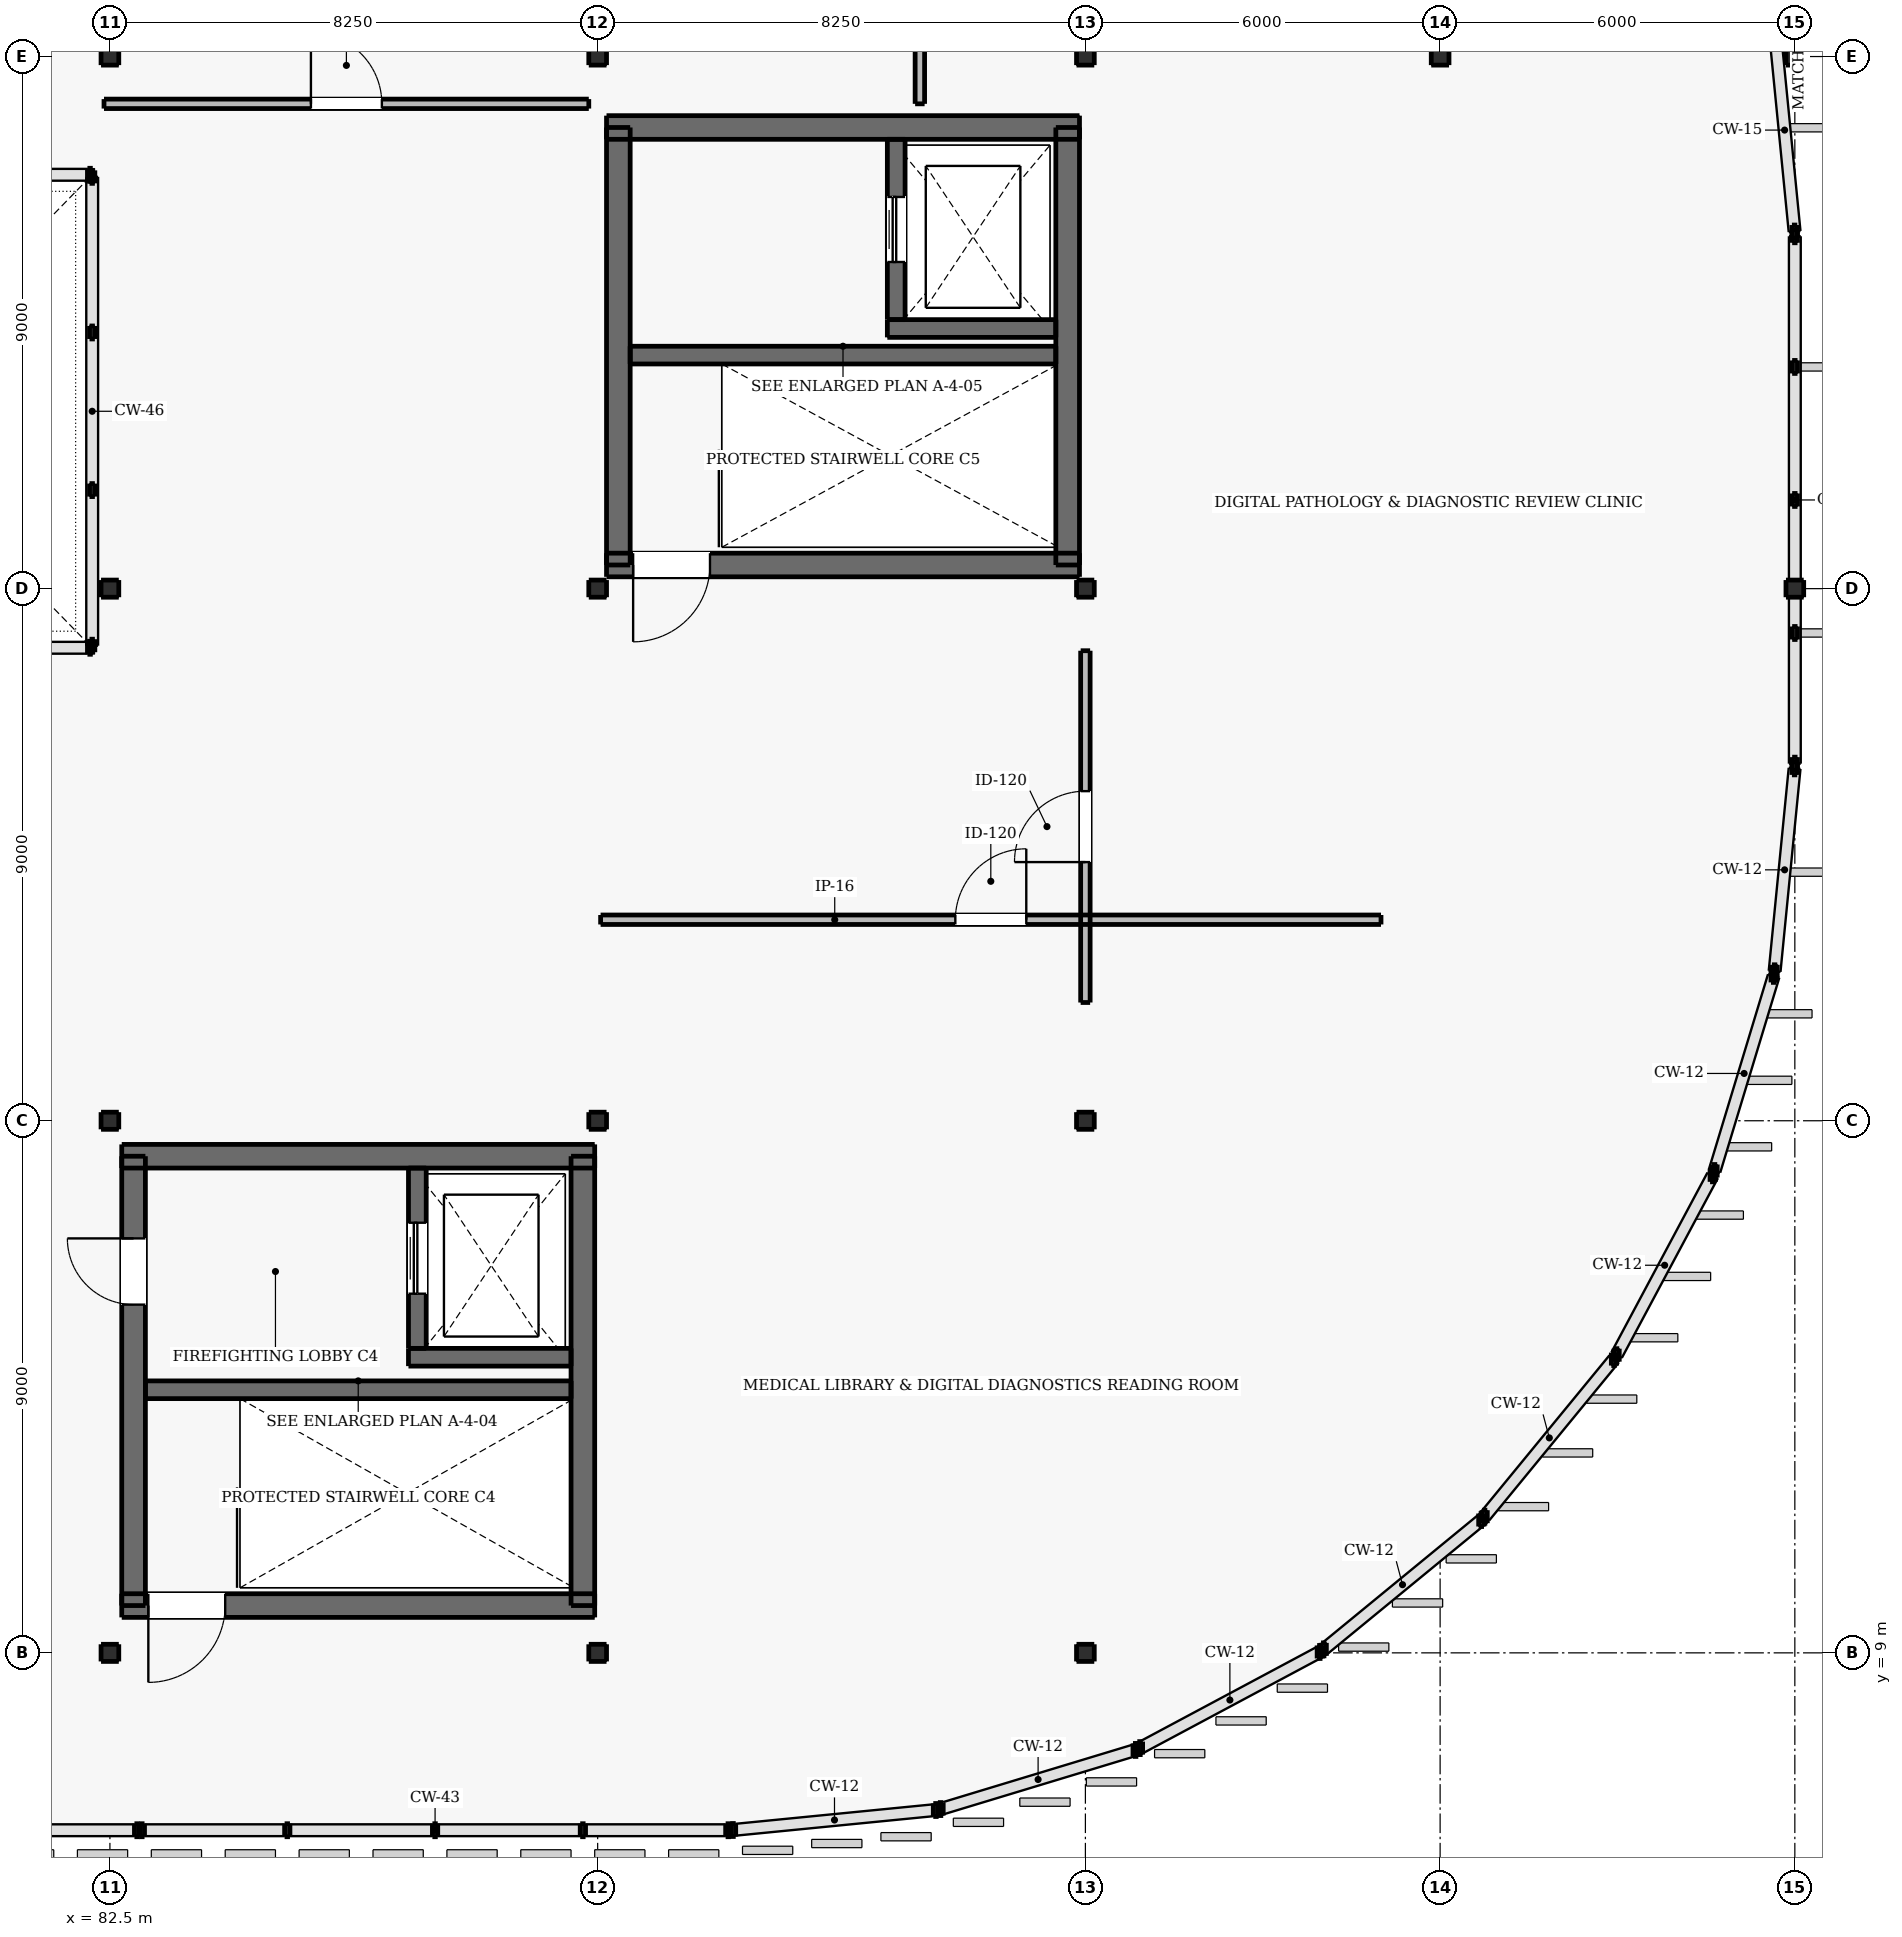
"""IFC4 building model, lengths in metres.
Left out: names, types, materials, properties, quantities, classifications, styles, units other than length and angle.
Written with IfcOpenShell. Run it as: python <this file> out.ifc"""

import sys

from ifc_helpers import new_model, si_unit, direction, frame, frame_2d, origin, origin_2d, place, context, subcontext, project, spatial, rectangle, i_section, extrude, element, fill, save


model = new_model("IFC4")
c1 = context("Model", 3, precision=1e-05, world=origin(), true_north=direction((0.0, 1.0)))
c2 = subcontext(c1, "Body", "Model", "MODEL_VIEW")
j1 = project(units=[si_unit("LENGTHUNIT", "METRE"), si_unit("PLANEANGLEUNIT", "RADIAN")], contexts=[c1])
p1 = place(None, origin())
s1 = spatial("IfcSite", under=j1, at=p1, CompositionType="ELEMENT")
p2 = place(p1, origin())
s2 = spatial("IfcBuilding", under=s1, at=p2, CompositionType="ELEMENT")
p3 = place(p2, frame((0.0, 0.0, 26.4)))
s3 = spatial("IfcBuildingStorey", under=s2, at=p3, CompositionType="ELEMENT", Elevation=26.4)
for number, where, z_axis, x_axis in (
    (1, (82.5, 9.0, 0.0), (0.0, 0.0, 1.0), (1.0, 0.0, 0.0)),
    (2, (82.5, 18.0, 0.0), (0.0, 0.0, 1.0), (1.0, 0.0, 0.0)),
    (3, (82.5, 27.0, 0.0), (0.0, 0.0, 1.0), (1.0, 0.0, 0.0)),
    (4, (82.5, 36.0, 0.0), (0.0, 0.0, 1.0), (1.0, 0.0, 0.0)),
    (5, (90.75, 9.0, 0.0), (0.0, 0.0, 1.0), (1.0, 0.0, 0.0)),
    (6, (90.75, 18.0, 0.0), (0.0, 0.0, 1.0), (1.0, 0.0, 0.0)),
    (7, (90.75, 27.0, 0.0), (0.0, 0.0, 1.0), (1.0, 0.0, 0.0)),
    (8, (90.75, 36.0, 0.0), (0.0, 0.0, 1.0), (1.0, 0.0, 0.0)),
    (9, (99.0, 9.0, 0.0), (0.0, 0.0, 1.0), (1.0, 0.0, 0.0)),
    (10, (99.0, 18.0, 0.0), (0.0, 0.0, 1.0), (1.0, 0.0, 0.0)),
    (11, (99.0, 27.0, 0.0), (0.0, 0.0, 1.0), (1.0, 0.0, 0.0)),
    (12, (99.0, 36.0, 0.0), (0.0, 0.0, 1.0), (1.0, 0.0, 0.0)),
    (13, (105.0, 36.0, 0.0), (0.0, 0.0, 1.0), (1.0, 0.0, 0.0)),
    (14, (111.0, 27.0, 0.0), (0.0, 0.0, 1.0), (1.0, 0.0, 0.0)),
    (15, (111.0, 36.0, 0.0), (0.0, 0.0, 1.0), (1.0, 0.0, 0.0)),
):
    element("IfcColumn", number, at=place(p3, frame(where, z_axis=z_axis, x_axis=x_axis)), inside=s3, PredefinedType="COLUMN", context=c2, shape_type="SweptSolid", body=[
        extrude(i_section(OverallWidth=0.3, OverallDepth=0.29, WebThickness=0.009, FlangeThickness=0.014, FilletRadius=0.027, at=origin_2d()), origin(), (0.0, 0.0, 1.0), 4.2),
    ])
p4 = place(p3, frame((82.7, 9.8, 0.0), z_axis=(0.0, 0.0, 1.0), x_axis=(1.0, 0.0, 0.0)))
e16 = element("IfcWall", 16, at=p4, inside=s3, PredefinedType="SHEAR", context=c2, shape_type="SweptSolid", body=[
    extrude(rectangle(XDim=8.0, YDim=0.4, at=frame_2d((4.0, 0.0))), origin(), (0.0, 0.0, 1.0), 4.2),
])
p5 = place(p4, frame((0.45, 0.0, 0.0)))
e17 = element("IfcOpeningElement", 17, at=p5, cuts=e16, PredefinedType="OPENING", context=c2, shape_type="SweptSolid", body=[
    extrude(rectangle(XDim=1.3, YDim=2.15, at=frame_2d((0.65, 1.075))), frame((0.0, 0.21, 0.0), z_axis=(0.0, -1.0, 0.0), x_axis=(1.0, 0.0, 0.0)), (0.0, 0.0, 1.0), 0.42),
])
p6 = place(p3, frame((82.7, 17.4, 0.0), z_axis=(0.0, 0.0, 1.0), x_axis=(1.0, 0.0, 0.0)))
e18 = element("IfcWall", 18, at=p6, inside=s3, PredefinedType="SHEAR", context=c2, shape_type="SweptSolid", body=[
    extrude(rectangle(XDim=8.0, YDim=0.4, at=frame_2d((4.0, 0.0))), origin(), (0.0, 0.0, 1.0), 4.2),
])
p7 = place(p3, frame((82.9, 9.8, 0.0), z_axis=(0.0, 0.0, 1.0), x_axis=(0.0, 1.0, 0.0)))
e19 = element("IfcWall", 19, at=p7, inside=s3, PredefinedType="SHEAR", context=c2, shape_type="SweptSolid", body=[
    extrude(rectangle(XDim=7.6, YDim=0.4, at=frame_2d((3.8, 0.0))), origin(), (0.0, 0.0, 1.0), 4.2),
])
p8 = place(p7, frame((5.09, 0.0, 0.0)))
e20 = element("IfcOpeningElement", 20, at=p8, cuts=e19, PredefinedType="OPENING", context=c2, shape_type="SweptSolid", body=[
    extrude(rectangle(XDim=1.12, YDim=2.15, at=frame_2d((0.56, 1.075))), frame((0.0, 0.21, 0.0), z_axis=(0.0, -1.0, 0.0), x_axis=(1.0, 0.0, 0.0)), (0.0, 0.0, 1.0), 0.42),
])
p9 = place(p3, frame((90.5, 9.8, 0.0), z_axis=(0.0, 0.0, 1.0), x_axis=(0.0, 1.0, 0.0)))
e21 = element("IfcWall", 21, at=p9, inside=s3, PredefinedType="SHEAR", context=c2, shape_type="SweptSolid", body=[
    extrude(rectangle(XDim=7.6, YDim=0.4, at=frame_2d((3.8, 0.0))), origin(), (0.0, 0.0, 1.0), 4.2),
])
p10 = place(p3, frame((83.1, 13.45, 0.0), z_axis=(0.0, 0.0, 1.0), x_axis=(1.0, 0.0, 0.0)))
e22 = element("IfcWall", 22, at=p10, inside=s3, PredefinedType="SHEAR", context=c2, shape_type="SweptSolid", body=[
    extrude(rectangle(XDim=7.2, YDim=0.3, at=frame_2d((3.6, 0.0))), origin(), (0.0, 0.0, 1.0), 4.2),
])
p11 = place(p3, frame((87.55, 14.0, 0.0), z_axis=(0.0, 0.0, 1.0), x_axis=(1.0, 0.0, 0.0)))
e23 = element("IfcWall", 23, at=p11, inside=s3, PredefinedType="SHEAR", context=c2, shape_type="SweptSolid", body=[
    extrude(rectangle(XDim=2.75, YDim=0.3, at=frame_2d((1.375, 0.0))), origin(), (0.0, 0.0, 1.0), 4.2),
])
p12 = place(p3, frame((87.7, 14.15, 0.0), z_axis=(0.0, 0.0, 1.0), x_axis=(0.0, 1.0, 0.0)))
e24 = element("IfcWall", 24, at=p12, inside=s3, PredefinedType="SHEAR", context=c2, shape_type="SweptSolid", body=[
    extrude(rectangle(XDim=3.05, YDim=0.3, at=frame_2d((1.525, 0.0))), origin(), (0.0, 0.0, 1.0), 4.2),
])
p13 = place(p12, frame((0.925, 0.0, 0.0)))
e25 = element("IfcOpeningElement", 25, at=p13, cuts=e24, PredefinedType="OPENING", context=c2, shape_type="SweptSolid", body=[
    extrude(rectangle(XDim=1.2, YDim=2.15, at=frame_2d((0.6, 1.075))), frame((0.0, 0.16, 0.0), z_axis=(0.0, -1.0, 0.0), x_axis=(1.0, 0.0, 0.0)), (0.0, 0.0, 1.0), 0.32),
])
p14 = place(p3, frame((90.9, 27.4, 0.0), z_axis=(0.0, 0.0, 1.0), x_axis=(1.0, 0.0, 0.0)))
e26 = element("IfcWall", 26, at=p14, inside=s3, PredefinedType="SHEAR", context=c2, shape_type="SweptSolid", body=[
    extrude(rectangle(XDim=8.0, YDim=0.4, at=frame_2d((4.0, 0.0))), origin(), (0.0, 0.0, 1.0), 4.2),
])
p15 = place(p14, frame((0.45, 0.0, 0.0)))
e27 = element("IfcOpeningElement", 27, at=p15, cuts=e26, PredefinedType="OPENING", context=c2, shape_type="SweptSolid", body=[
    extrude(rectangle(XDim=1.3, YDim=2.15, at=frame_2d((0.65, 1.075))), frame((0.0, 0.21, 0.0), z_axis=(0.0, -1.0, 0.0), x_axis=(1.0, 0.0, 0.0)), (0.0, 0.0, 1.0), 0.42),
])
p16 = place(p3, frame((90.9, 34.8, 0.0), z_axis=(0.0, 0.0, 1.0), x_axis=(1.0, 0.0, 0.0)))
e28 = element("IfcWall", 28, at=p16, inside=s3, PredefinedType="SHEAR", context=c2, shape_type="SweptSolid", body=[
    extrude(rectangle(XDim=8.0, YDim=0.4, at=frame_2d((4.0, 0.0))), origin(), (0.0, 0.0, 1.0), 4.2),
])
for number, where, z_axis, x_axis in (
    (29, (91.1, 27.4, 0.0), (0.0, 0.0, 1.0), (0.0, 1.0, 0.0)),
    (30, (98.7, 27.4, 0.0), (0.0, 0.0, 1.0), (0.0, 1.0, 0.0)),
):
    element("IfcWall", number, at=place(p3, frame(where, z_axis=z_axis, x_axis=x_axis)), inside=s3, PredefinedType="SHEAR", context=c2, shape_type="SweptSolid", body=[
        extrude(rectangle(XDim=7.4, YDim=0.4, at=frame_2d((3.7, 0.0))), origin(), (0.0, 0.0, 1.0), 4.2),
    ])
p17 = place(p3, frame((91.3, 30.95, 0.0), z_axis=(0.0, 0.0, 1.0), x_axis=(1.0, 0.0, 0.0)))
e31 = element("IfcWall", 31, at=p17, inside=s3, PredefinedType="SHEAR", context=c2, shape_type="SweptSolid", body=[
    extrude(rectangle(XDim=7.2, YDim=0.3, at=frame_2d((3.6, 0.0))), origin(), (0.0, 0.0, 1.0), 4.2),
])
p18 = place(p3, frame((95.65, 31.4, 0.0), z_axis=(0.0, 0.0, 1.0), x_axis=(1.0, 0.0, 0.0)))
e32 = element("IfcWall", 32, at=p18, inside=s3, PredefinedType="SHEAR", context=c2, shape_type="SweptSolid", body=[
    extrude(rectangle(XDim=2.85, YDim=0.3, at=frame_2d((1.425, 0.0))), origin(), (0.0, 0.0, 1.0), 4.2),
])
p19 = place(p3, frame((95.8, 31.55, 0.0), z_axis=(0.0, 0.0, 1.0), x_axis=(0.0, 1.0, 0.0)))
e33 = element("IfcWall", 33, at=p19, inside=s3, PredefinedType="SHEAR", context=c2, shape_type="SweptSolid", body=[
    extrude(rectangle(XDim=3.05, YDim=0.3, at=frame_2d((1.525, 0.0))), origin(), (0.0, 0.0, 1.0), 4.2),
])
p20 = place(p19, frame((0.975, 0.0, 0.0)))
e34 = element("IfcOpeningElement", 34, at=p20, cuts=e33, PredefinedType="OPENING", context=c2, shape_type="SweptSolid", body=[
    extrude(rectangle(XDim=1.1, YDim=2.15, at=frame_2d((0.55, 1.075))), frame((0.0, 0.16, 0.0), z_axis=(0.0, -1.0, 0.0), x_axis=(1.0, 0.0, 0.0)), (0.0, 0.0, 1.0), 0.32),
])
p21 = place(p3, frame((90.8, 21.4, 0.0), z_axis=(0.0, 0.0, 1.0), x_axis=(1.0, 0.0, 0.0)))
e35 = element("IfcWall", 35, at=p21, inside=s3, PredefinedType="PARTITIONING", context=c2, shape_type="SweptSolid", body=[
    extrude(rectangle(XDim=13.2, YDim=0.16, at=frame_2d((6.6, 0.0))), origin(), (0.0, 0.0, 1.0), 3.93),
])
p22 = place(p21, frame((6.0, 0.0, 0.0)))
e36 = element("IfcOpeningElement", 36, at=p22, cuts=e35, PredefinedType="OPENING", context=c2, shape_type="SweptSolid", body=[
    extrude(rectangle(XDim=1.2, YDim=2.2, at=frame_2d((0.6, 1.1))), frame((0.0, 0.09, 0.0), z_axis=(0.0, -1.0, 0.0), x_axis=(1.0, 0.0, 0.0)), (0.0, 0.0, 1.0), 0.18),
])
p23 = place(p3, frame((99.0, 20.0, 0.0), z_axis=(0.0, 0.0, 1.0), x_axis=(0.0, 1.0, 0.0)))
e37 = element("IfcWall", 37, at=p23, inside=s3, PredefinedType="PARTITIONING", context=c2, shape_type="SweptSolid", body=[
    extrude(rectangle(XDim=5.95, YDim=0.16, at=frame_2d((2.975, 0.0))), origin(), (0.0, 0.0, 1.0), 3.53),
])
p24 = place(p23, frame((2.375, 0.0, 0.0)))
e38 = element("IfcOpeningElement", 38, at=p24, cuts=e37, PredefinedType="OPENING", context=c2, shape_type="SweptSolid", body=[
    extrude(rectangle(XDim=1.2, YDim=2.2, at=frame_2d((0.6, 1.1))), frame((0.0, 0.09, 0.0), z_axis=(0.0, -1.0, 0.0), x_axis=(1.0, 0.0, 0.0)), (0.0, 0.0, 1.0), 0.18),
])
p25 = place(p3, frame((82.4, 35.2, 0.0), z_axis=(0.0, 0.0, 1.0), x_axis=(1.0, 0.0, 0.0)))
e39 = element("IfcWall", 39, at=p25, inside=s3, PredefinedType="PARTITIONING", context=c2, shape_type="SweptSolid", body=[
    extrude(rectangle(XDim=8.2, YDim=0.16, at=frame_2d((4.1, 0.0))), origin(), (0.0, 0.0, 1.0), 3.93),
])
p26 = place(p25, frame((3.5, 0.0, 0.0)))
e40 = element("IfcOpeningElement", 40, at=p26, cuts=e39, PredefinedType="OPENING", context=c2, shape_type="SweptSolid", body=[
    extrude(rectangle(XDim=1.2, YDim=2.2, at=frame_2d((0.6, 1.1))), frame((0.0, 0.09, 0.0), z_axis=(0.0, -1.0, 0.0), x_axis=(1.0, 0.0, 0.0)), (0.0, 0.0, 1.0), 0.18),
])
p27 = place(p3, frame((96.2, 35.2, 0.0), z_axis=(0.0, 0.0, 1.0), x_axis=(0.0, 1.0, 0.0)))
e41 = element("IfcWall", 41, at=p27, inside=s3, PredefinedType="PARTITIONING", context=c2, shape_type="SweptSolid", body=[
    extrude(rectangle(XDim=9.3, YDim=0.16, at=frame_2d((4.65, 0.0))), origin(), (0.0, 0.0, 1.0), 3.49),
])
p28 = place(p27, frame((3.75, 0.0, 0.0)))
e42 = element("IfcOpeningElement", 42, at=p28, cuts=e41, PredefinedType="OPENING", context=c2, shape_type="SweptSolid", body=[
    extrude(rectangle(XDim=1.8, YDim=2.25, at=frame_2d((0.9, 1.125))), frame((0.0, 0.09, 0.0), z_axis=(0.0, -1.0, 0.0), x_axis=(1.0, 0.0, 0.0)), (0.0, 0.0, 1.0), 0.18),
])
p29 = place(p13, origin())
e43 = element("IfcDoor", 43, at=p29, inside=s3, OperationType="DOUBLE_DOOR_SLIDING", PredefinedType="DOOR", context=c2, shape_type="SweptSolid", body=[
    extrude(rectangle(XDim=1.2, YDim=2.15, at=frame_2d((0.6, 1.075))), frame((0.0, 0.025, 0.0), z_axis=(0.0, -1.0, 0.0), x_axis=(1.0, 0.0, 0.0)), (0.0, 0.0, 1.0), 0.05),
])
fill(e25, e43)
p30 = place(p8, origin())
e44 = element("IfcDoor", 44, at=p30, inside=s3, OperationType="SINGLE_SWING_RIGHT", PredefinedType="DOOR", context=c2, shape_type="SweptSolid", body=[
    extrude(rectangle(XDim=1.12, YDim=2.15, at=frame_2d((0.56, 1.075))), frame((0.0, 0.025, 0.0), z_axis=(0.0, -1.0, 0.0), x_axis=(1.0, 0.0, 0.0)), (0.0, 0.0, 1.0), 0.05),
])
fill(e20, e44)
p31 = place(p5, frame((1.3, 0.0, 0.0), z_axis=(0.0, 0.0, 1.0), x_axis=(-1.0, 0.0, 0.0)))
e45 = element("IfcDoor", 45, at=p31, inside=s3, OperationType="SINGLE_SWING_LEFT", PredefinedType="DOOR", context=c2, shape_type="SweptSolid", body=[
    extrude(rectangle(XDim=1.3, YDim=2.15, at=frame_2d((0.65, 1.075))), frame((0.0, 0.025, 0.0), z_axis=(0.0, -1.0, 0.0), x_axis=(1.0, 0.0, 0.0)), (0.0, 0.0, 1.0), 0.05),
])
fill(e17, e45)
p32 = place(p20, origin())
e46 = element("IfcDoor", 46, at=p32, inside=s3, OperationType="DOUBLE_DOOR_SLIDING", PredefinedType="DOOR", context=c2, shape_type="SweptSolid", body=[
    extrude(rectangle(XDim=1.1, YDim=2.15, at=frame_2d((0.55, 1.075))), frame((0.0, 0.025, 0.0), z_axis=(0.0, -1.0, 0.0), x_axis=(1.0, 0.0, 0.0)), (0.0, 0.0, 1.0), 0.05),
])
fill(e34, e46)
p33 = place(p15, frame((1.3, 0.0, 0.0), z_axis=(0.0, 0.0, 1.0), x_axis=(-1.0, 0.0, 0.0)))
e47 = element("IfcDoor", 47, at=p33, inside=s3, OperationType="SINGLE_SWING_LEFT", PredefinedType="DOOR", context=c2, shape_type="SweptSolid", body=[
    extrude(rectangle(XDim=1.3, YDim=2.15, at=frame_2d((0.65, 1.075))), frame((0.0, 0.025, 0.0), z_axis=(0.0, -1.0, 0.0), x_axis=(1.0, 0.0, 0.0)), (0.0, 0.0, 1.0), 0.05),
])
fill(e27, e47)
p34 = place(p22, origin())
e48 = element("IfcDoor", 48, at=p34, inside=s3, OperationType="SINGLE_SWING_RIGHT", PredefinedType="DOOR", context=c2, shape_type="SweptSolid", body=[
    extrude(rectangle(XDim=1.2, YDim=2.2, at=frame_2d((0.6, 1.1))), frame((0.0, 0.025, 0.0), z_axis=(0.0, -1.0, 0.0), x_axis=(1.0, 0.0, 0.0)), (0.0, 0.0, 1.0), 0.05),
])
fill(e36, e48)
p35 = place(p24, origin())
e49 = element("IfcDoor", 49, at=p35, inside=s3, OperationType="SINGLE_SWING_LEFT", PredefinedType="DOOR", context=c2, shape_type="SweptSolid", body=[
    extrude(rectangle(XDim=1.2, YDim=2.2, at=frame_2d((0.6, 1.1))), frame((0.0, 0.025, 0.0), z_axis=(0.0, -1.0, 0.0), x_axis=(1.0, 0.0, 0.0)), (0.0, 0.0, 1.0), 0.05),
])
fill(e38, e49)
p36 = place(p26, origin())
e50 = element("IfcDoor", 50, at=p36, inside=s3, OperationType="SINGLE_SWING_LEFT", PredefinedType="DOOR", context=c2, shape_type="SweptSolid", body=[
    extrude(rectangle(XDim=1.2, YDim=2.2, at=frame_2d((0.6, 1.1))), frame((0.0, 0.025, 0.0), z_axis=(0.0, -1.0, 0.0), x_axis=(1.0, 0.0, 0.0)), (0.0, 0.0, 1.0), 0.05),
])
fill(e40, e50)
save(model, sys.argv[1])
